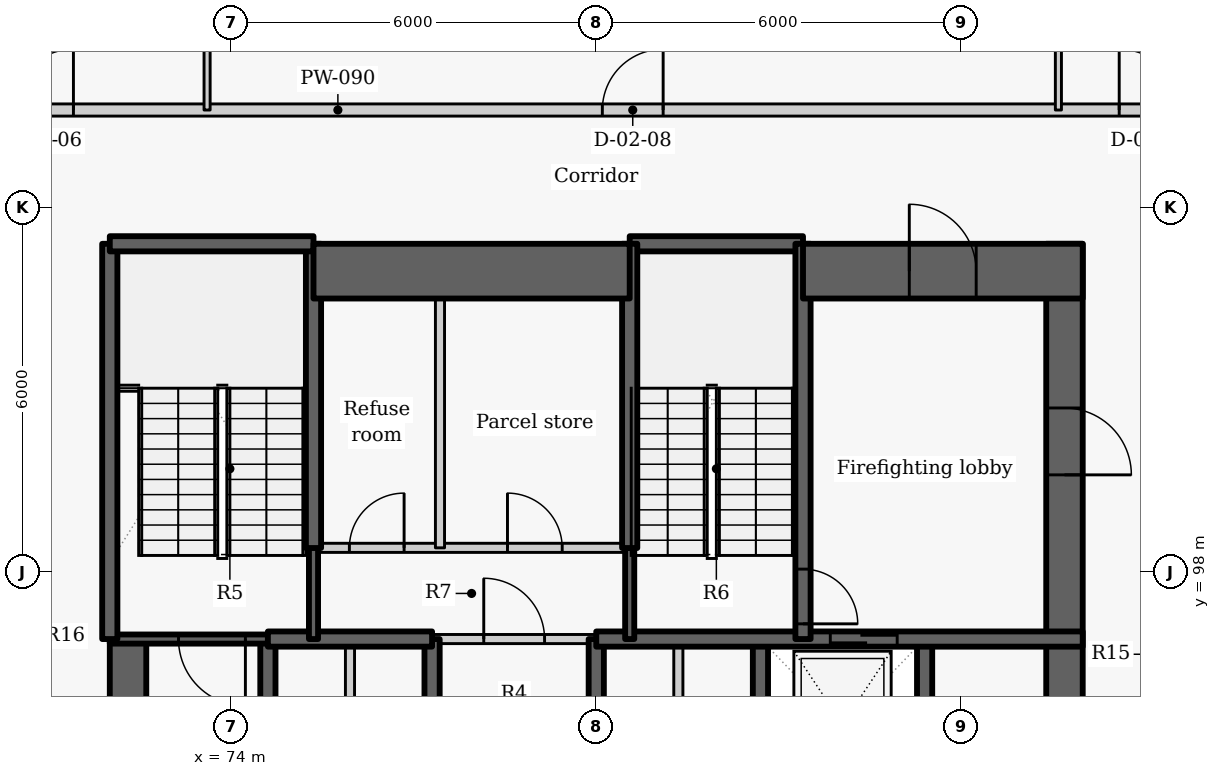
"""IFC4 building model, lengths in metres.
Left out: names, types, materials, properties, quantities, classifications, styles, units other than length and angle.
Written with IfcOpenShell. Run it as: python <this file> out.ifc"""

import sys

from ifc_helpers import new_model, si_unit, direction, frame, frame_2d, origin, place, context, subcontext, project, spatial, rectangle, extrude, element, fill, save


model = new_model("IFC4")
c1 = context("Model", 3, precision=1e-05, world=origin(), true_north=direction((0.0, 1.0)))
c2 = subcontext(c1, "Body", "Model", "MODEL_VIEW")
j1 = project(units=[si_unit("LENGTHUNIT", "METRE"), si_unit("PLANEANGLEUNIT", "RADIAN")], contexts=[c1])
p1 = place(None, origin())
s1 = spatial("IfcSite", under=j1, at=p1, CompositionType="ELEMENT")
p2 = place(p1, origin())
s2 = spatial("IfcBuilding", under=s1, at=p2, CompositionType="ELEMENT")
p3 = place(p2, frame((0.0, 0.0, 11.4)))
s3 = spatial("IfcBuildingStorey", under=s2, at=p3, CompositionType="ELEMENT", Elevation=11.4)
p4 = place(p3, frame((74.6, 94.1, -0.3), z_axis=(0.0, 0.0, 1.0), x_axis=(0.0, 1.0, 0.0)))
e1 = element("IfcWall", 1, at=p4, inside=s3, PredefinedType="SHEAR", context=c2, shape_type="SweptSolid", body=[
    extrude(rectangle(XDim=2.8, YDim=0.25, at=frame_2d((1.4, 0.0))), origin(), (0.0, 0.0, 1.0), 4.2),
])
p5 = place(p3, frame((72.3, 87.8, -0.3), z_axis=(0.0, 0.0, 1.0), x_axis=(0.0, 1.0, 0.0)))
e2 = element("IfcWall", 2, at=p5, inside=s3, PredefinedType="SHEAR", context=c2, shape_type="SweptSolid", body=[
    extrude(rectangle(XDim=9.1, YDim=0.6, at=frame_2d((4.55, 0.0))), origin(), (0.0, 0.0, 1.0), 4.2),
])
for number, where, z_axis, x_axis in (
    (3, (77.3, 94.1, -0.3), (0.0, 0.0, 1.0), (0.0, 1.0, 0.0)),
    (4, (80.0, 94.1, -0.3), (0.0, 0.0, 1.0), (0.0, 1.0, 0.0)),
    (5, (82.7, 94.1, -0.3), (0.0, 0.0, 1.0), (0.0, 1.0, 0.0)),
    (6, (85.4, 94.1, -0.3), (0.0, 0.0, 1.0), (0.0, 1.0, 0.0)),
):
    element("IfcWall", number, at=place(p3, frame(where, z_axis=z_axis, x_axis=x_axis)), inside=s3, PredefinedType="SHEAR", context=c2, shape_type="SweptSolid", body=[
        extrude(rectangle(XDim=2.8, YDim=0.25, at=frame_2d((1.4, 0.0))), origin(), (0.0, 0.0, 1.0), 4.2),
    ])
p6 = place(p3, frame((87.7, 103.4, -0.3), z_axis=(0.0, 0.0, 1.0), x_axis=(0.0, -1.0, 0.0)))
e7 = element("IfcWall", 7, at=p6, inside=s3, PredefinedType="SHEAR", context=c2, shape_type="SweptSolid", body=[
    extrude(rectangle(XDim=15.6, YDim=0.6, at=frame_2d((7.8, 0.0))), origin(), (0.0, 0.0, 1.0), 4.2),
])
p7 = place(p6, frame((2.7, 0.0, 0.3)))
e8 = element("IfcOpeningElement", 8, at=p7, cuts=e7, PredefinedType="OPENING", context=c2, shape_type="SweptSolid", body=[
    extrude(rectangle(XDim=1.1, YDim=2.1, at=frame_2d((0.55, 1.05))), frame((0.0, 0.31, 0.0), z_axis=(0.0, -1.0, 0.0), x_axis=(1.0, 0.0, 0.0)), (0.0, 0.0, 1.0), 0.62),
])
p8 = place(p3, frame((74.6, 96.9, -0.3), z_axis=(0.0, 0.0, 1.0), x_axis=(-1.0, 0.0, 0.0)))
e9 = element("IfcWall", 9, at=p8, inside=s3, PredefinedType="SHEAR", context=c2, shape_type="SweptSolid", body=[
    extrude(rectangle(XDim=2.6, YDim=0.15, at=frame_2d((1.3, 0.0))), origin(), (0.0, 0.0, 1.0), 4.2),
])
p9 = place(p8, frame((0.37, 0.0, 0.3)))
e10 = element("IfcOpeningElement", 10, at=p9, cuts=e9, PredefinedType="OPENING", context=c2, shape_type="SweptSolid", body=[
    extrude(rectangle(XDim=1.1, YDim=2.1, at=frame_2d((0.55, 1.05))), frame((0.0, 0.085, 0.0), z_axis=(0.0, -1.0, 0.0), x_axis=(1.0, 0.0, 0.0)), (0.0, 0.0, 1.0), 0.17),
])
p10 = place(p3, frame((75.95, 94.1, 0.0), z_axis=(0.0, 0.0, 1.0), x_axis=(0.0, 1.0, 0.0)))
e11 = element("IfcWall", 11, at=p10, inside=s3, PredefinedType="PARTITIONING", context=c2, shape_type="SweptSolid", body=[
    extrude(rectangle(XDim=2.8, YDim=0.15, at=frame_2d((1.4, 0.0))), origin(), (0.0, 0.0, 1.0), 3.9),
])
p11 = place(p3, frame((74.6, 96.9, -0.3), z_axis=(0.0, 0.0, 1.0), x_axis=(1.0, 0.0, 0.0)))
e12 = element("IfcWall", 12, at=p11, inside=s3, PredefinedType="SHEAR", context=c2, shape_type="SweptSolid", body=[
    extrude(rectangle(XDim=2.7, YDim=0.25, at=frame_2d((1.35, 0.0))), origin(), (0.0, 0.0, 1.0), 4.2),
])
p12 = place(p3, frame((80.0, 96.9, -0.3), z_axis=(0.0, 0.0, 1.0), x_axis=(1.0, 0.0, 0.0)))
e13 = element("IfcWall", 13, at=p12, inside=s3, PredefinedType="SHEAR", context=c2, shape_type="SweptSolid", body=[
    extrude(rectangle(XDim=8.0, YDim=0.25, at=frame_2d((4.0, 0.0))), origin(), (0.0, 0.0, 1.0), 4.2),
])
p13 = place(p12, frame((3.849, 0.0, 0.3)))
e14 = element("IfcOpeningElement", 14, at=p13, cuts=e13, PredefinedType="OPENING", context=c2, shape_type="SweptSolid", body=[
    extrude(rectangle(XDim=1.1, YDim=2.1, at=frame_2d((0.55, 1.05))), frame((0.0, 0.135, 0.0), z_axis=(0.0, -1.0, 0.0), x_axis=(1.0, 0.0, 0.0)), (0.0, 0.0, 1.0), 0.27),
])
p14 = place(p3, frame((77.3, 96.9, 0.0), z_axis=(0.0, 0.0, 1.0), x_axis=(1.0, 0.0, 0.0)))
e15 = element("IfcWall", 15, at=p14, inside=s3, PredefinedType="PARTITIONING", context=c2, shape_type="SweptSolid", body=[
    extrude(rectangle(XDim=2.7, YDim=0.15, at=frame_2d((1.35, 0.0))), origin(), (0.0, 0.0, 1.0), 3.9),
])
p15 = place(p14, frame((0.85, 0.0, 0.0)))
e16 = element("IfcOpeningElement", 16, at=p15, cuts=e15, PredefinedType="OPENING", context=c2, shape_type="SweptSolid", body=[
    extrude(rectangle(XDim=1.0, YDim=2.1, at=frame_2d((0.5, 1.05))), frame((0.0, 0.085, 0.0), z_axis=(0.0, -1.0, 0.0), x_axis=(1.0, 0.0, 0.0)), (0.0, 0.0, 1.0), 0.17),
])
p16 = place(p3, frame((81.35, 94.1, 0.0), z_axis=(0.0, 0.0, 1.0), x_axis=(0.0, 1.0, 0.0)))
e17 = element("IfcWall", 17, at=p16, inside=s3, PredefinedType="PARTITIONING", context=c2, shape_type="SweptSolid", body=[
    extrude(rectangle(XDim=2.8, YDim=0.15, at=frame_2d((1.4, 0.0))), origin(), (0.0, 0.0, 1.0), 3.9),
])
p17 = place(p3, frame((75.35, 96.9, -0.3), z_axis=(0.0, 0.0, 1.0), x_axis=(0.0, 1.0, 0.0)))
e18 = element("IfcWall", 18, at=p17, inside=s3, PredefinedType="SHEAR", context=c2, shape_type="SweptSolid", body=[
    extrude(rectangle(XDim=1.503, YDim=0.15, at=frame_2d((0.751, 0.0))), origin(), (0.0, 0.0, 1.0), 4.2),
])
p18 = place(p3, frame((75.35, 98.397, -0.3), z_axis=(0.0, 0.0, 1.0), x_axis=(0.0, 1.0, 0.0)))
e19 = element("IfcWall", 19, at=p18, inside=s3, PredefinedType="SHEAR", context=c2, shape_type="SweptSolid", body=[
    extrude(rectangle(XDim=5.003, YDim=0.25, at=frame_2d((2.501, 0.0))), origin(), (0.0, 0.0, 1.0), 4.2),
])
p19 = place(p3, frame((72.0, 96.9, -0.3), z_axis=(0.0, 0.0, 1.0), x_axis=(0.0, 1.0, 0.0)))
e20 = element("IfcWall", 20, at=p19, inside=s3, PredefinedType="SHEAR", context=c2, shape_type="SweptSolid", body=[
    extrude(rectangle(XDim=6.5, YDim=0.25, at=frame_2d((3.25, 0.0))), origin(), (0.0, 0.0, 1.0), 4.2),
])
p20 = place(p3, frame((72.0, 103.4, -0.3), z_axis=(0.0, 0.0, 1.0), x_axis=(1.0, 0.0, 0.0)))
e21 = element("IfcWall", 21, at=p20, inside=s3, PredefinedType="SHEAR", context=c2, shape_type="SweptSolid", body=[
    extrude(rectangle(XDim=3.35, YDim=0.25, at=frame_2d((1.675, 0.0))), origin(), (0.0, 0.0, 1.0), 4.2),
])
p21 = place(p3, frame((80.55, 103.4, -0.3), z_axis=(0.0, 0.0, 1.0), x_axis=(1.0, 0.0, 0.0)))
e22 = element("IfcWall", 22, at=p21, inside=s3, PredefinedType="SHEAR", context=c2, shape_type="SweptSolid", body=[
    extrude(rectangle(XDim=2.85, YDim=0.25, at=frame_2d((1.425, 0.0))), origin(), (0.0, 0.0, 1.0), 4.2),
])
p22 = place(p3, frame((83.4, 103.4, -0.3), z_axis=(0.0, 0.0, 1.0), x_axis=(0.0, -1.0, 0.0)))
e23 = element("IfcWall", 23, at=p22, inside=s3, PredefinedType="SHEAR", context=c2, shape_type="SweptSolid", body=[
    extrude(rectangle(XDim=6.5, YDim=0.25, at=frame_2d((3.25, 0.0))), origin(), (0.0, 0.0, 1.0), 4.2),
])
p23 = place(p22, frame((5.35, 0.0, 0.3)))
e24 = element("IfcOpeningElement", 24, at=p23, cuts=e23, PredefinedType="OPENING", context=c2, shape_type="SweptSolid", body=[
    extrude(rectangle(XDim=0.9, YDim=2.1, at=frame_2d((0.45, 1.05))), frame((0.0, 0.135, 0.0), z_axis=(0.0, -1.0, 0.0), x_axis=(1.0, 0.0, 0.0)), (0.0, 0.0, 1.0), 0.27),
])
p24 = place(p3, frame((80.55, 96.9, -0.3), z_axis=(0.0, 0.0, 1.0), x_axis=(0.0, 1.0, 0.0)))
e25 = element("IfcWall", 25, at=p24, inside=s3, PredefinedType="SHEAR", context=c2, shape_type="SweptSolid", body=[
    extrude(rectangle(XDim=1.503, YDim=0.15, at=frame_2d((0.751, 0.0))), origin(), (0.0, 0.0, 1.0), 4.2),
])
p25 = place(p3, frame((80.55, 98.397, -0.3), z_axis=(0.0, 0.0, 1.0), x_axis=(0.0, 1.0, 0.0)))
e26 = element("IfcWall", 26, at=p25, inside=s3, PredefinedType="SHEAR", context=c2, shape_type="SweptSolid", body=[
    extrude(rectangle(XDim=5.003, YDim=0.25, at=frame_2d((2.501, 0.0))), origin(), (0.0, 0.0, 1.0), 4.2),
])
p26 = place(p3, frame((75.35, 102.95, -0.3), z_axis=(0.0, 0.0, 1.0), x_axis=(1.0, 0.0, 0.0)))
e27 = element("IfcWall", 27, at=p26, inside=s3, PredefinedType="SHEAR", context=c2, shape_type="SweptSolid", body=[
    extrude(rectangle(XDim=5.2, YDim=0.9, at=frame_2d((2.6, 0.0))), origin(), (0.0, 0.0, 1.0), 4.2),
])
p27 = place(p3, frame((83.4, 102.95, -0.3), z_axis=(0.0, 0.0, 1.0), x_axis=(1.0, 0.0, 0.0)))
e28 = element("IfcWall", 28, at=p27, inside=s3, PredefinedType="SHEAR", context=c2, shape_type="SweptSolid", body=[
    extrude(rectangle(XDim=4.6, YDim=0.9, at=frame_2d((2.3, 0.0))), origin(), (0.0, 0.0, 1.0), 4.2),
])
p28 = place(p27, frame((1.748, 0.0, 0.3)))
e29 = element("IfcOpeningElement", 29, at=p28, cuts=e28, PredefinedType="OPENING", context=c2, shape_type="SweptSolid", body=[
    extrude(rectangle(XDim=1.1, YDim=2.1, at=frame_2d((0.55, 1.05))), frame((0.0, 0.46, 0.0), z_axis=(0.0, -1.0, 0.0), x_axis=(1.0, 0.0, 0.0)), (0.0, 0.0, 1.0), 0.92),
])
p29 = place(p3, frame((75.35, 98.4, 0.0), z_axis=(0.0, 0.0, 1.0), x_axis=(1.0, 0.0, 0.0)))
e30 = element("IfcWall", 30, at=p29, inside=s3, PredefinedType="PARTITIONING", context=c2, shape_type="SweptSolid", body=[
    extrude(rectangle(XDim=5.2, YDim=0.15, at=frame_2d((2.6, 0.0))), origin(), (0.0, 0.0, 1.0), 3.9),
])
p30 = place(p29, frame((0.59, 0.0, 0.0)))
e31 = element("IfcOpeningElement", 31, at=p30, cuts=e30, PredefinedType="OPENING", context=c2, shape_type="SweptSolid", body=[
    extrude(rectangle(XDim=0.9, YDim=2.1, at=frame_2d((0.45, 1.05))), frame((0.0, 0.085, 0.0), z_axis=(0.0, -1.0, 0.0), x_axis=(1.0, 0.0, 0.0)), (0.0, 0.0, 1.0), 0.17),
])
p31 = place(p29, frame((3.19, 0.0, 0.0)))
e32 = element("IfcOpeningElement", 32, at=p31, cuts=e30, PredefinedType="OPENING", context=c2, shape_type="SweptSolid", body=[
    extrude(rectangle(XDim=0.9, YDim=2.1, at=frame_2d((0.45, 1.05))), frame((0.0, 0.085, 0.0), z_axis=(0.0, -1.0, 0.0), x_axis=(1.0, 0.0, 0.0)), (0.0, 0.0, 1.0), 0.17),
])
p32 = place(p3, frame((77.43, 98.4, 0.0), z_axis=(0.0, 0.0, 1.0), x_axis=(0.0, 1.0, 0.0)))
e33 = element("IfcWall", 33, at=p32, inside=s3, PredefinedType="PARTITIONING", context=c2, shape_type="SweptSolid", body=[
    extrude(rectangle(XDim=5.0, YDim=0.15, at=frame_2d((2.5, 0.0))), origin(), (0.0, 0.0, 1.0), 3.9),
])
p33 = place(p3, frame((69.8, 105.6, 0.0), z_axis=(0.0, 0.0, 1.0), x_axis=(1.0, 0.0, 0.0)))
e34 = element("IfcWall", 34, at=p33, inside=s3, PredefinedType="PARTITIONING", context=c2, shape_type="SweptSolid", body=[
    extrude(rectangle(XDim=20.4, YDim=0.2, at=frame_2d((10.2, 0.0))), origin(), (0.0, 0.0, 1.0), 3.9),
])
p34 = place(p33, frame((0.602, 0.0, 0.0)))
e35 = element("IfcOpeningElement", 35, at=p34, cuts=e34, PredefinedType="OPENING", context=c2, shape_type="SweptSolid", body=[
    extrude(rectangle(XDim=1.0, YDim=2.1, at=frame_2d((0.5, 1.05))), frame((0.0, 0.11, 0.0), z_axis=(0.0, -1.0, 0.0), x_axis=(1.0, 0.0, 0.0)), (0.0, 0.0, 1.0), 0.22),
])
p35 = place(p33, frame((18.8, 0.0, 0.0)))
e36 = element("IfcOpeningElement", 36, at=p35, cuts=e34, PredefinedType="OPENING", context=c2, shape_type="SweptSolid", body=[
    extrude(rectangle(XDim=1.0, YDim=2.1, at=frame_2d((0.5, 1.05))), frame((0.0, 0.11, 0.0), z_axis=(0.0, -1.0, 0.0), x_axis=(1.0, 0.0, 0.0)), (0.0, 0.0, 1.0), 0.22),
])
p36 = place(p33, frame((10.3, 0.0, 0.0)))
e37 = element("IfcOpeningElement", 37, at=p36, cuts=e34, PredefinedType="OPENING", context=c2, shape_type="SweptSolid", body=[
    extrude(rectangle(XDim=1.0, YDim=2.1, at=frame_2d((0.5, 1.05))), frame((0.0, 0.11, 0.0), z_axis=(0.0, -1.0, 0.0), x_axis=(1.0, 0.0, 0.0)), (0.0, 0.0, 1.0), 0.22),
])
for number, where, z_axis, x_axis in (
    (38, (73.6, 105.6, 0.0), (0.0, 0.0, 1.0), (0.0, 1.0, 0.0)),
    (39, (87.6, 105.6, 0.0), (0.0, 0.0, 1.0), (0.0, 1.0, 0.0)),
):
    element("IfcWall", number, at=place(p3, frame(where, z_axis=z_axis, x_axis=x_axis)), inside=s3, PredefinedType="PARTITIONING", context=c2, shape_type="SweptSolid", body=[
        extrude(rectangle(XDim=7.1, YDim=0.1, at=frame_2d((3.55, 0.0))), origin(), (0.0, 0.0, 1.0), 3.13),
    ])
p37 = place(p13, origin())
e40 = element("IfcDoor", 40, at=p37, inside=s3, OperationType="SLIDING_TO_LEFT", PredefinedType="DOOR", context=c2, shape_type="SweptSolid", body=[
    extrude(rectangle(XDim=1.1, YDim=2.1, at=frame_2d((0.55, 1.05))), frame((0.0, 0.025, 0.0), z_axis=(0.0, -1.0, 0.0), x_axis=(1.0, 0.0, 0.0)), (0.0, 0.0, 1.0), 0.05),
])
fill(e14, e40)
p38 = place(p15, origin())
e41 = element("IfcDoor", 41, at=p38, inside=s3, OperationType="SINGLE_SWING_LEFT", PredefinedType="DOOR", context=c2, shape_type="SweptSolid", body=[
    extrude(rectangle(XDim=1.0, YDim=2.1, at=frame_2d((0.5, 1.05))), frame((0.0, 0.025, 0.0), z_axis=(0.0, -1.0, 0.0), x_axis=(1.0, 0.0, 0.0)), (0.0, 0.0, 1.0), 0.05),
])
fill(e16, e41)
p39 = place(p30, origin())
e42 = element("IfcDoor", 42, at=p39, inside=s3, OperationType="SINGLE_SWING_RIGHT", PredefinedType="DOOR", context=c2, shape_type="SweptSolid", body=[
    extrude(rectangle(XDim=0.9, YDim=2.1, at=frame_2d((0.45, 1.05))), frame((0.0, 0.025, 0.0), z_axis=(0.0, -1.0, 0.0), x_axis=(1.0, 0.0, 0.0)), (0.0, 0.0, 1.0), 0.05),
])
fill(e31, e42)
p40 = place(p31, origin())
e43 = element("IfcDoor", 43, at=p40, inside=s3, OperationType="SINGLE_SWING_LEFT", PredefinedType="DOOR", context=c2, shape_type="SweptSolid", body=[
    extrude(rectangle(XDim=0.9, YDim=2.1, at=frame_2d((0.45, 1.05))), frame((0.0, 0.025, 0.0), z_axis=(0.0, -1.0, 0.0), x_axis=(1.0, 0.0, 0.0)), (0.0, 0.0, 1.0), 0.05),
])
fill(e32, e43)
p41 = place(p9, origin())
e44 = element("IfcDoor", 44, at=p41, inside=s3, OperationType="SINGLE_SWING_LEFT", PredefinedType="DOOR", context=c2, shape_type="SweptSolid", body=[
    extrude(rectangle(XDim=1.1, YDim=2.1, at=frame_2d((0.55, 1.05))), frame((0.0, 0.025, 0.0), z_axis=(0.0, -1.0, 0.0), x_axis=(1.0, 0.0, 0.0)), (0.0, 0.0, 1.0), 0.05),
])
fill(e10, e44)
p42 = place(p23, origin())
e45 = element("IfcDoor", 45, at=p42, inside=s3, OperationType="SINGLE_SWING_RIGHT", PredefinedType="DOOR", context=c2, shape_type="SweptSolid", body=[
    extrude(rectangle(XDim=0.9, YDim=2.1, at=frame_2d((0.45, 1.05))), frame((0.0, 0.025, 0.0), z_axis=(0.0, -1.0, 0.0), x_axis=(1.0, 0.0, 0.0)), (0.0, 0.0, 1.0), 0.05),
])
fill(e24, e45)
p43 = place(p34, origin())
e46 = element("IfcDoor", 46, at=p43, inside=s3, OperationType="SINGLE_SWING_RIGHT", PredefinedType="DOOR", context=c2, shape_type="SweptSolid", body=[
    extrude(rectangle(XDim=1.0, YDim=2.1, at=frame_2d((0.5, 1.05))), frame((0.0, 0.025, 0.0), z_axis=(0.0, -1.0, 0.0), x_axis=(1.0, 0.0, 0.0)), (0.0, 0.0, 1.0), 0.05),
])
fill(e35, e46)
p44 = place(p35, origin())
e47 = element("IfcDoor", 47, at=p44, inside=s3, OperationType="SINGLE_SWING_LEFT", PredefinedType="DOOR", context=c2, shape_type="SweptSolid", body=[
    extrude(rectangle(XDim=1.0, YDim=2.1, at=frame_2d((0.5, 1.05))), frame((0.0, 0.025, 0.0), z_axis=(0.0, -1.0, 0.0), x_axis=(1.0, 0.0, 0.0)), (0.0, 0.0, 1.0), 0.05),
])
fill(e36, e47)
p45 = place(p36, origin())
e48 = element("IfcDoor", 48, at=p45, inside=s3, OperationType="SINGLE_SWING_RIGHT", PredefinedType="DOOR", context=c2, shape_type="SweptSolid", body=[
    extrude(rectangle(XDim=1.0, YDim=2.1, at=frame_2d((0.5, 1.05))), frame((0.0, 0.025, 0.0), z_axis=(0.0, -1.0, 0.0), x_axis=(1.0, 0.0, 0.0)), (0.0, 0.0, 1.0), 0.05),
])
fill(e37, e48)
p46 = place(p7, origin())
e49 = element("IfcDoor", 49, at=p46, inside=s3, OperationType="SINGLE_SWING_RIGHT", PredefinedType="DOOR", context=c2, shape_type="SweptSolid", body=[
    extrude(rectangle(XDim=1.1, YDim=2.1, at=frame_2d((0.55, 1.05))), frame((0.0, 0.025, 0.0), z_axis=(0.0, -1.0, 0.0), x_axis=(1.0, 0.0, 0.0)), (0.0, 0.0, 1.0), 0.05),
])
fill(e8, e49)
p47 = place(p28, origin())
e50 = element("IfcDoor", 50, at=p47, inside=s3, OperationType="SINGLE_SWING_LEFT", PredefinedType="DOOR", context=c2, shape_type="SweptSolid", body=[
    extrude(rectangle(XDim=1.1, YDim=2.1, at=frame_2d((0.55, 1.05))), frame((0.0, 0.025, 0.0), z_axis=(0.0, -1.0, 0.0), x_axis=(1.0, 0.0, 0.0)), (0.0, 0.0, 1.0), 0.05),
])
fill(e29, e50)
save(model, sys.argv[1])
